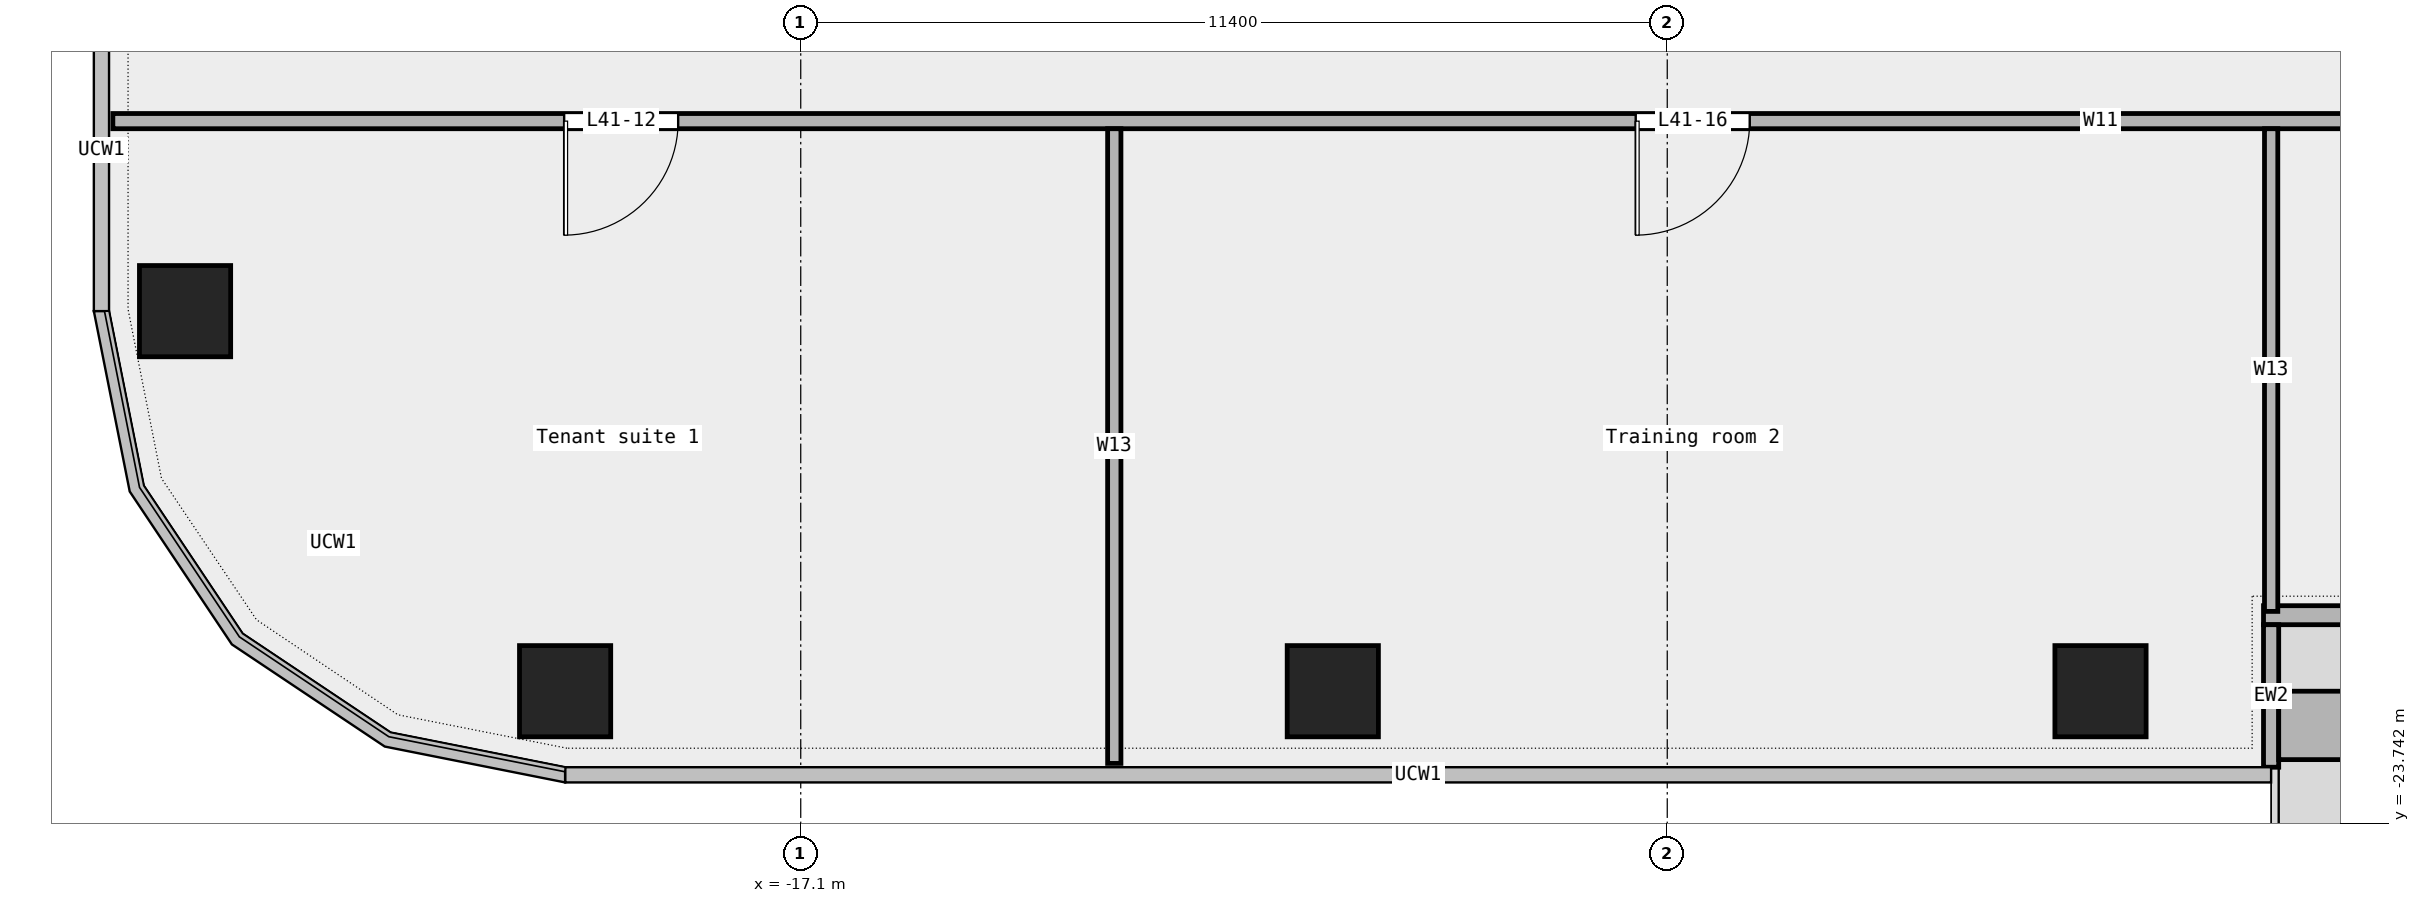
"""IFC4 building model, lengths in metres.
Left out: names, types, materials, properties, quantities, classifications, styles, units other than length and angle.
Written with IfcOpenShell. Run it as: python <this file> out.ifc"""

import sys

from ifc_helpers import new_model, si_unit, direction, frame, frame_2d, origin, origin_2d, place, context, subcontext, project, spatial, rectangle, extrude, element, fill, save


model = new_model("IFC4")
c1 = context("Model", 3, precision=1e-05, world=origin(), true_north=direction((0.0, 1.0)))
c2 = subcontext(c1, "Body", "Model", "MODEL_VIEW")
j1 = project(units=[si_unit("LENGTHUNIT", "METRE"), si_unit("PLANEANGLEUNIT", "RADIAN")], contexts=[c1])
p1 = place(None, origin())
s1 = spatial("IfcSite", under=j1, at=p1, CompositionType="ELEMENT")
p2 = place(p1, origin())
s2 = spatial("IfcBuilding", under=s1, at=p2, CompositionType="ELEMENT")
p3 = place(p2, frame((0.0, 0.0, 197.0)))
s3 = spatial("IfcBuildingStorey", under=s2, at=p3, CompositionType="ELEMENT", Elevation=197.0)
for number, where, z_axis, x_axis in (
    (1, (-20.2, -22.0, 0.0), (0.0, 0.0, 1.0), (1.0, 0.0, 0.0)),
    (2, (-10.1, -22.0, 0.0), (0.0, 0.0, 1.0), (1.0, 0.0, 0.0)),
    (3, (0.0, -22.0, 0.0), (0.0, 0.0, 1.0), (1.0, 0.0, 0.0)),
    (4, (-25.2, -17.0, 0.0), (0.0, 0.0, 1.0), (1.0, 0.0, 0.0)),
):
    element("IfcColumn", number, at=place(p3, frame(where, z_axis=z_axis, x_axis=x_axis)), inside=s3, PredefinedType="COLUMN", context=c2, shape_type="SweptSolid", body=[
        extrude(rectangle(XDim=1.2, YDim=1.2, at=origin_2d()), origin(), (0.0, 0.0, 1.0), 3.6),
    ])
p4 = place(p3, frame((2.145, -21.0, 0.0), z_axis=(0.0, 0.0, 1.0), x_axis=(1.0, 0.0, 0.0)))
e5 = element("IfcWall", 5, at=p4, inside=s3, PredefinedType="STANDARD", context=c2, shape_type="SweptSolid", body=[
    extrude(rectangle(XDim=13.667, YDim=0.25, at=frame_2d((6.833, 0.0))), origin(), (0.0, 0.0, 1.0), 3.6),
])
p5 = place(p4, frame((1.75, 0.0, 0.45)))
e6 = element("IfcOpeningElement", 6, at=p5, cuts=e5, PredefinedType="OPENING", context=c2, shape_type="SweptSolid", body=[
    extrude(rectangle(XDim=1.5, YDim=2.4, at=frame_2d((0.75, 1.2))), frame((0.0, 0.137, 0.0), z_axis=(0.0, -1.0, 0.0), x_axis=(1.0, 0.0, 0.0)), (0.0, 0.0, 1.0), 0.274),
])
p6 = place(p4, frame((5.25, 0.0, 0.0)))
e7 = element("IfcOpeningElement", 7, at=p6, cuts=e5, PredefinedType="OPENING", context=c2, shape_type="SweptSolid", body=[
    extrude(rectangle(XDim=1.8, YDim=2.4, at=frame_2d((0.9, 1.2))), frame((0.0, 0.137, 0.0), z_axis=(0.0, -1.0, 0.0), x_axis=(1.0, 0.0, 0.0)), (0.0, 0.0, 1.0), 0.274),
])
p7 = place(p4, frame((10.5, 0.0, 0.45)))
e8 = element("IfcOpeningElement", 8, at=p7, cuts=e5, PredefinedType="OPENING", context=c2, shape_type="SweptSolid", body=[
    extrude(rectangle(XDim=1.5, YDim=2.4, at=frame_2d((0.75, 1.2))), frame((0.0, 0.137, 0.0), z_axis=(0.0, -1.0, 0.0), x_axis=(1.0, 0.0, 0.0)), (0.0, 0.0, 1.0), 0.274),
])
p8 = place(p3, frame((2.244, -23.0, 0.0), z_axis=(0.0, 0.0, 1.0), x_axis=(0.0, 1.0, 0.0)))
e9 = element("IfcWall", 9, at=p8, inside=s3, PredefinedType="STANDARD", context=c2, shape_type="SweptSolid", body=[
    extrude(rectangle(XDim=1.875, YDim=0.2, at=frame_2d((0.938, 0.0))), origin(), (0.0, 0.0, 1.0), 3.6),
])
p9 = place(p3, frame((2.344, -22.45, 0.0), z_axis=(0.0, 0.0, 1.0), x_axis=(1.0, 0.0, 0.0)))
e10 = element("IfcWall", 10, at=p9, inside=s3, PredefinedType="STANDARD", context=c2, shape_type="SweptSolid", body=[
    extrude(rectangle(XDim=3.6, YDim=0.9, at=frame_2d((1.8, 0.0))), origin(), (0.0, 0.0, 1.0), 0.7),
])
p10 = place(p3, frame((-26.15, -14.5, 0.0), z_axis=(0.0, 0.0, 1.0), x_axis=(1.0, 0.0, 0.0)))
e11 = element("IfcWall", 11, at=p10, inside=s3, PredefinedType="PARTITIONING", context=c2, shape_type="SweptSolid", body=[
    extrude(rectangle(XDim=52.3, YDim=0.2, at=frame_2d((26.15, 0.0))), origin(), (0.0, 0.0, 1.0), 3.6),
])
p11 = place(p10, frame((46.38, 0.0, 0.0)))
e12 = element("IfcOpeningElement", 12, at=p11, cuts=e11, PredefinedType="OPENING", context=c2, shape_type="SweptSolid", body=[
    extrude(rectangle(XDim=1.2, YDim=2.1, at=frame_2d((0.6, 1.05))), frame((0.0, 0.112, 0.0), z_axis=(0.0, -1.0, 0.0), x_axis=(1.0, 0.0, 0.0)), (0.0, 0.0, 1.0), 0.224),
])
p12 = place(p10, frame((5.938, 0.0, 0.0)))
e13 = element("IfcOpeningElement", 13, at=p12, cuts=e11, PredefinedType="OPENING", context=c2, shape_type="SweptSolid", body=[
    extrude(rectangle(XDim=1.5, YDim=2.1, at=frame_2d((0.75, 1.05))), frame((0.0, 0.112, 0.0), z_axis=(0.0, -1.0, 0.0), x_axis=(1.0, 0.0, 0.0)), (0.0, 0.0, 1.0), 0.224),
])
p13 = place(p10, frame((20.035, 0.0, 0.0)))
e14 = element("IfcOpeningElement", 14, at=p13, cuts=e11, PredefinedType="OPENING", context=c2, shape_type="SweptSolid", body=[
    extrude(rectangle(XDim=1.5, YDim=2.1, at=frame_2d((0.75, 1.05))), frame((0.0, 0.112, 0.0), z_axis=(0.0, -1.0, 0.0), x_axis=(1.0, 0.0, 0.0)), (0.0, 0.0, 1.0), 0.224),
])
p14 = place(p10, frame((34.528, 0.0, 0.0)))
e15 = element("IfcOpeningElement", 15, at=p14, cuts=e11, PredefinedType="OPENING", context=c2, shape_type="SweptSolid", body=[
    extrude(rectangle(XDim=1.2, YDim=2.1, at=frame_2d((0.6, 1.05))), frame((0.0, 0.112, 0.0), z_axis=(0.0, -1.0, 0.0), x_axis=(1.0, 0.0, 0.0)), (0.0, 0.0, 1.0), 0.224),
])
p15 = place(p3, frame((-12.975, -22.95, 0.0), z_axis=(0.0, 0.0, 1.0), x_axis=(0.0, 1.0, 0.0)))
e16 = element("IfcWall", 16, at=p15, inside=s3, PredefinedType="PARTITIONING", context=c2, shape_type="SweptSolid", body=[
    extrude(rectangle(XDim=8.35, YDim=0.175, at=frame_2d((4.175, 0.0))), origin(), (0.0, 0.0, 1.0), 3.6),
])
p16 = place(p3, frame((2.245, -20.95, 0.0), z_axis=(0.0, 0.0, 1.0), x_axis=(0.0, 1.0, 0.0)))
e17 = element("IfcWall", 17, at=p16, inside=s3, PredefinedType="PARTITIONING", context=c2, shape_type="SweptSolid", body=[
    extrude(rectangle(XDim=6.35, YDim=0.175, at=frame_2d((3.175, 0.0))), origin(), (0.0, 0.0, 1.0), 3.6),
])
p17 = place(p12, origin())
e18 = element("IfcDoor", 18, at=p17, inside=s3, OperationType="DOUBLE_DOOR_SINGLE_SWING", PredefinedType="DOOR", context=c2, shape_type="SweptSolid", body=[
    extrude(rectangle(XDim=1.5, YDim=2.1, at=frame_2d((0.75, 1.05))), frame((0.0, 0.025, 0.0), z_axis=(0.0, -1.0, 0.0), x_axis=(1.0, 0.0, 0.0)), (0.0, 0.0, 1.0), 0.05),
])
fill(e13, e18)
p18 = place(p13, origin())
e19 = element("IfcDoor", 19, at=p18, inside=s3, OperationType="DOUBLE_DOOR_SINGLE_SWING", PredefinedType="DOOR", context=c2, shape_type="SweptSolid", body=[
    extrude(rectangle(XDim=1.5, YDim=2.1, at=frame_2d((0.75, 1.05))), frame((0.0, 0.025, 0.0), z_axis=(0.0, -1.0, 0.0), x_axis=(1.0, 0.0, 0.0)), (0.0, 0.0, 1.0), 0.05),
])
fill(e14, e19)
save(model, sys.argv[1])
